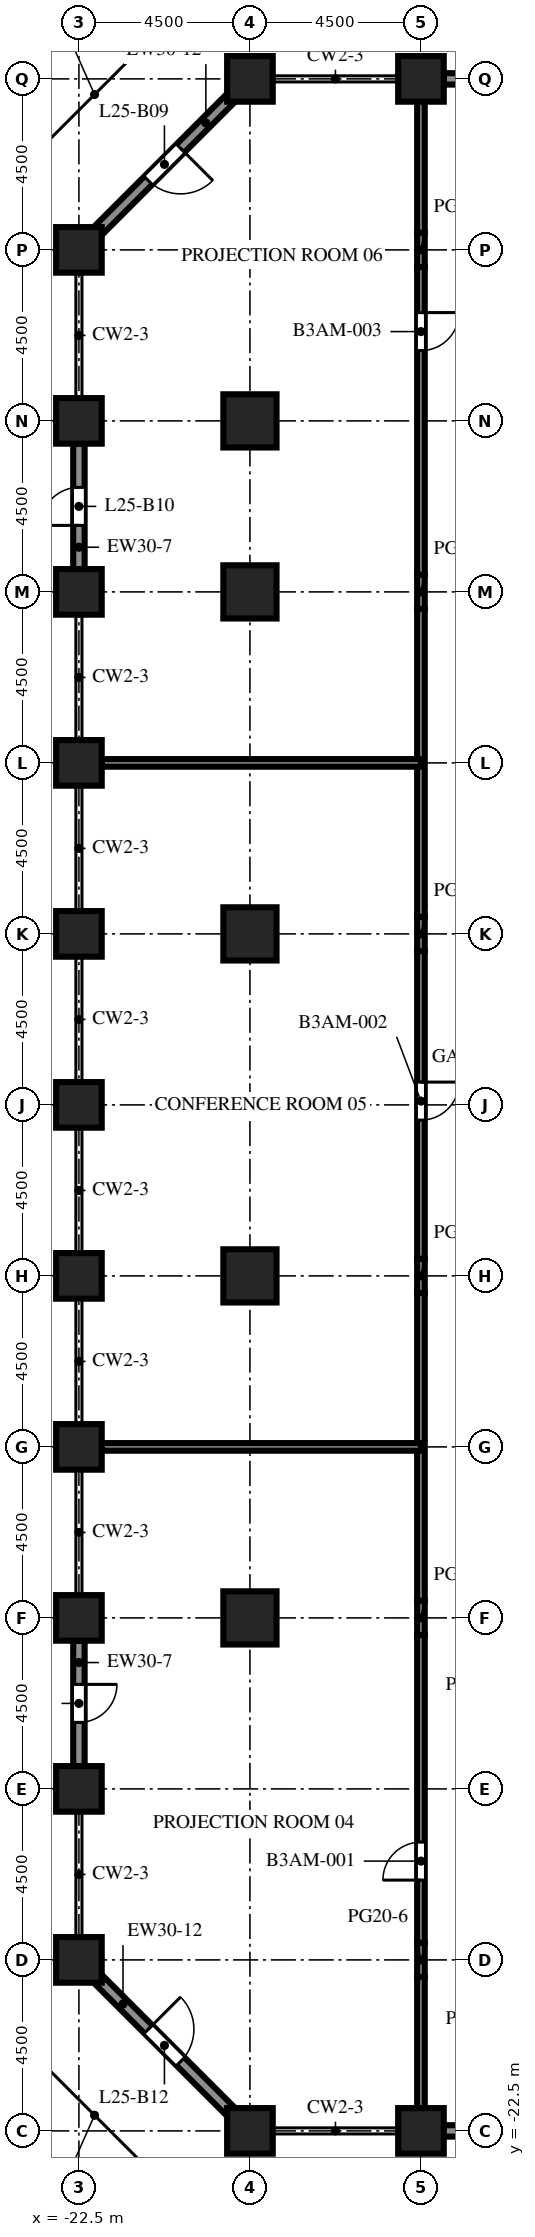
"""IFC4 building model, lengths in metres.
Left out: names, types, materials, properties, quantities, classifications, styles, units other than length and angle.
Written with IfcOpenShell. Run it as: python <this file> out.ifc"""

import sys

from ifc_helpers import new_model, si_unit, direction, frame, frame_2d, origin, origin_2d, place, context, subcontext, project, spatial, rectangle, extrude, element, fill, save


model = new_model("IFC4")
c1 = context("Model", 3, precision=1e-05, world=origin(), true_north=direction((0.0, 1.0)))
c2 = subcontext(c1, "Body", "Model", "MODEL_VIEW")
j1 = project(units=[si_unit("LENGTHUNIT", "METRE"), si_unit("PLANEANGLEUNIT", "RADIAN")], contexts=[c1])
p1 = place(None, origin())
s1 = spatial("IfcSite", under=j1, at=p1, CompositionType="ELEMENT")
p2 = place(p1, origin())
s2 = spatial("IfcBuilding", under=s1, at=p2, CompositionType="ELEMENT")
p3 = place(p2, frame((0.0, 0.0, 110.7)))
s3 = spatial("IfcBuildingStorey", under=s2, at=p3, CompositionType="ELEMENT", Elevation=110.7)
p4 = place(p3, frame((-22.5, -18.0, 0.0), z_axis=(0.0, 0.0, 1.0), x_axis=(1.0, 0.0, 0.0)))
e1 = element("IfcColumn", 1, at=p4, inside=s3, PredefinedType="COLUMN", context=c2, shape_type="SweptSolid", body=[
    extrude(rectangle(XDim=1.2, YDim=1.2, at=origin_2d()), origin(), (0.0, 0.0, 1.0), 3.75),
])
p5 = place(p3, frame((-22.5, -13.5, 0.0), z_axis=(0.0, 0.0, 1.0), x_axis=(1.0, 0.0, 0.0)))
e2 = element("IfcColumn", 2, at=p5, inside=s3, PredefinedType="COLUMN", context=c2, shape_type="SweptSolid", body=[
    extrude(rectangle(XDim=1.2, YDim=1.2, at=origin_2d()), origin(), (0.0, 0.0, 1.0), 6.0),
])
p6 = place(p3, frame((-22.5, -9.0, 0.0), z_axis=(0.0, 0.0, 1.0), x_axis=(1.0, 0.0, 0.0)))
e3 = element("IfcColumn", 3, at=p6, inside=s3, PredefinedType="COLUMN", context=c2, shape_type="SweptSolid", body=[
    extrude(rectangle(XDim=1.2, YDim=1.2, at=origin_2d()), origin(), (0.0, 0.0, 1.0), 3.75),
])
p7 = place(p3, frame((-22.5, -4.5, 0.0), z_axis=(0.0, 0.0, 1.0), x_axis=(1.0, 0.0, 0.0)))
e4 = element("IfcColumn", 4, at=p7, inside=s3, PredefinedType="COLUMN", context=c2, shape_type="SweptSolid", body=[
    extrude(rectangle(XDim=1.2, YDim=1.2, at=origin_2d()), origin(), (0.0, 0.0, 1.0), 6.0),
])
p8 = place(p3, frame((-22.5, 0.0, 0.0), z_axis=(0.0, 0.0, 1.0), x_axis=(1.0, 0.0, 0.0)))
e5 = element("IfcColumn", 5, at=p8, inside=s3, PredefinedType="COLUMN", context=c2, shape_type="SweptSolid", body=[
    extrude(rectangle(XDim=1.2, YDim=1.2, at=origin_2d()), origin(), (0.0, 0.0, 1.0), 3.75),
])
p9 = place(p3, frame((-22.5, 4.5, 0.0), z_axis=(0.0, 0.0, 1.0), x_axis=(1.0, 0.0, 0.0)))
e6 = element("IfcColumn", 6, at=p9, inside=s3, PredefinedType="COLUMN", context=c2, shape_type="SweptSolid", body=[
    extrude(rectangle(XDim=1.2, YDim=1.2, at=origin_2d()), origin(), (0.0, 0.0, 1.0), 6.0),
])
p10 = place(p3, frame((-22.5, 9.0, 0.0), z_axis=(0.0, 0.0, 1.0), x_axis=(1.0, 0.0, 0.0)))
e7 = element("IfcColumn", 7, at=p10, inside=s3, PredefinedType="COLUMN", context=c2, shape_type="SweptSolid", body=[
    extrude(rectangle(XDim=1.2, YDim=1.2, at=origin_2d()), origin(), (0.0, 0.0, 1.0), 3.75),
])
p11 = place(p3, frame((-22.5, 13.5, 0.0), z_axis=(0.0, 0.0, 1.0), x_axis=(1.0, 0.0, 0.0)))
e8 = element("IfcColumn", 8, at=p11, inside=s3, PredefinedType="COLUMN", context=c2, shape_type="SweptSolid", body=[
    extrude(rectangle(XDim=1.2, YDim=1.2, at=origin_2d()), origin(), (0.0, 0.0, 1.0), 6.0),
])
p12 = place(p3, frame((-22.5, 18.0, 0.0), z_axis=(0.0, 0.0, 1.0), x_axis=(1.0, 0.0, 0.0)))
e9 = element("IfcColumn", 9, at=p12, inside=s3, PredefinedType="COLUMN", context=c2, shape_type="SweptSolid", body=[
    extrude(rectangle(XDim=1.2, YDim=1.2, at=origin_2d()), origin(), (0.0, 0.0, 1.0), 3.75),
])
p13 = place(p3, frame((-22.5, 22.5, 0.0), z_axis=(0.0, 0.0, 1.0), x_axis=(1.0, 0.0, 0.0)))
e10 = element("IfcColumn", 10, at=p13, inside=s3, PredefinedType="COLUMN", context=c2, shape_type="SweptSolid", body=[
    extrude(rectangle(XDim=1.2, YDim=1.2, at=origin_2d()), origin(), (0.0, 0.0, 1.0), 6.0),
])
p14 = place(p3, frame((-22.5, 27.0, 0.0), z_axis=(0.0, 0.0, 1.0), x_axis=(1.0, 0.0, 0.0)))
e11 = element("IfcColumn", 11, at=p14, inside=s3, PredefinedType="COLUMN", context=c2, shape_type="SweptSolid", body=[
    extrude(rectangle(XDim=1.2, YDim=1.2, at=origin_2d()), origin(), (0.0, 0.0, 1.0), 3.75),
])
for number, where, z_axis, x_axis in (
    (12, (-18.0, -22.5, 0.0), (0.0, 0.0, 1.0), (1.0, 0.0, 0.0)),
    (13, (-18.0, 31.5, 0.0), (0.0, 0.0, 1.0), (1.0, 0.0, 0.0)),
    (14, (-13.5, -22.5, 0.0), (0.0, 0.0, 1.0), (1.0, 0.0, 0.0)),
    (15, (-13.5, 31.5, 0.0), (0.0, 0.0, 1.0), (1.0, 0.0, 0.0)),
):
    element("IfcColumn", number, at=place(p3, frame(where, z_axis=z_axis, x_axis=x_axis)), inside=s3, PredefinedType="COLUMN", context=c2, shape_type="SweptSolid", body=[
        extrude(rectangle(XDim=1.2, YDim=1.2, at=origin_2d()), origin(), (0.0, 0.0, 1.0), 6.0),
    ])
for number, where, z_axis, x_axis in (
    (16, (-18.0, -9.0, 0.0), (0.0, 0.0, 1.0), (1.0, 0.0, 0.0)),
    (17, (-18.0, 0.0, 0.0), (0.0, 0.0, 1.0), (1.0, 0.0, 0.0)),
    (18, (-18.0, 9.0, 0.0), (0.0, 0.0, 1.0), (1.0, 0.0, 0.0)),
    (19, (-18.0, 18.0, 0.0), (0.0, 0.0, 1.0), (1.0, 0.0, 0.0)),
):
    element("IfcColumn", number, at=place(p3, frame(where, z_axis=z_axis, x_axis=x_axis)), inside=s3, PredefinedType="COLUMN", context=c2, shape_type="SweptSolid", body=[
        extrude(rectangle(XDim=1.4, YDim=1.4, at=origin_2d()), origin(), (0.0, 0.0, 1.0), 5.55),
    ])
p15 = place(p3, frame((-18.0, 22.5, 0.0), z_axis=(0.0, 0.0, 1.0), x_axis=(1.0, 0.0, 0.0)))
e20 = element("IfcColumn", 20, at=p15, inside=s3, PredefinedType="COLUMN", context=c2, shape_type="SweptSolid", body=[
    extrude(rectangle(XDim=1.4, YDim=1.4, at=origin_2d()), origin(), (0.0, 0.0, 1.0), 6.0),
])
p16 = place(p3, frame((-9.6, -22.5, 0.0), z_axis=(0.0, 0.0, 1.0), x_axis=(-1.0, 0.0, 0.0)))
e21 = element("IfcWall", 21, at=p16, inside=s3, PredefinedType="SOLIDWALL", context=c2, shape_type="SweptSolid", body=[
    extrude(rectangle(XDim=3.3, YDim=0.3, at=frame_2d((1.65, 0.0))), origin(), (0.0, 0.0, 1.0), 4.65),
])
p17 = place(p16, frame((1.15, 0.0, 0.0)))
e22 = element("IfcOpeningElement", 22, at=p17, cuts=e21, PredefinedType="OPENING", context=c2, shape_type="SweptSolid", body=[
    extrude(rectangle(XDim=1.0, YDim=2.2, at=frame_2d((0.5, 1.1))), frame((0.0, 0.16, 0.0), z_axis=(0.0, -1.0, 0.0), x_axis=(1.0, 0.0, 0.0)), (0.0, 0.0, 1.0), 0.32),
])
p18 = place(p3, frame((-12.9, 31.5, 0.0), z_axis=(0.0, 0.0, 1.0), x_axis=(1.0, 0.0, 0.0)))
e23 = element("IfcWall", 23, at=p18, inside=s3, PredefinedType="SOLIDWALL", context=c2, shape_type="SweptSolid", body=[
    extrude(rectangle(XDim=3.3, YDim=0.3, at=frame_2d((1.65, 0.0))), origin(), (0.0, 0.0, 1.0), 4.65),
])
p19 = place(p18, frame((1.15, 0.0, 0.0)))
e24 = element("IfcOpeningElement", 24, at=p19, cuts=e23, PredefinedType="OPENING", context=c2, shape_type="SweptSolid", body=[
    extrude(rectangle(XDim=1.0, YDim=2.2, at=frame_2d((0.5, 1.1))), frame((0.0, 0.16, 0.0), z_axis=(0.0, -1.0, 0.0), x_axis=(1.0, 0.0, 0.0)), (0.0, 0.0, 1.0), 0.32),
])
p20 = place(p3, frame((-22.006, 27.494, 0.0), z_axis=(0.0, 0.0, 1.0), x_axis=(0.707106781187, 0.707106781187, 0.0)))
e25 = element("IfcWall", 25, at=p20, inside=s3, PredefinedType="SOLIDWALL", context=c2, shape_type="SweptSolid", body=[
    extrude(rectangle(XDim=4.967, YDim=0.3, at=frame_2d((2.483, 0.0))), origin(), (0.0, 0.0, 1.0), 3.75),
])
p21 = place(p20, frame((1.884, 0.0, 0.0)))
e26 = element("IfcOpeningElement", 26, at=p21, cuts=e25, PredefinedType="OPENING", context=c2, shape_type="SweptSolid", body=[
    extrude(rectangle(XDim=1.2, YDim=2.2, at=frame_2d((0.6, 1.1))), frame((0.0, 0.16, 0.0), z_axis=(0.0, -1.0, 0.0), x_axis=(1.0, 0.0, 0.0)), (0.0, 0.0, 1.0), 0.32),
])
p22 = place(p3, frame((-22.5, 18.6, 0.0), z_axis=(0.0, 0.0, 1.0), x_axis=(0.0, 1.0, 0.0)))
e27 = element("IfcWall", 27, at=p22, inside=s3, PredefinedType="SOLIDWALL", context=c2, shape_type="SweptSolid", body=[
    extrude(rectangle(XDim=3.3, YDim=0.3, at=frame_2d((1.65, 0.0))), origin(), (0.0, 0.0, 1.0), 4.65),
])
p23 = place(p22, frame((1.15, 0.0, 0.0)))
e28 = element("IfcOpeningElement", 28, at=p23, cuts=e27, PredefinedType="OPENING", context=c2, shape_type="SweptSolid", body=[
    extrude(rectangle(XDim=1.0, YDim=2.2, at=frame_2d((0.5, 1.1))), frame((0.0, 0.16, 0.0), z_axis=(0.0, -1.0, 0.0), x_axis=(1.0, 0.0, 0.0)), (0.0, 0.0, 1.0), 0.32),
])
p24 = place(p3, frame((-22.5, -12.9, 0.0), z_axis=(0.0, 0.0, 1.0), x_axis=(0.0, 1.0, 0.0)))
e29 = element("IfcWall", 29, at=p24, inside=s3, PredefinedType="SOLIDWALL", context=c2, shape_type="SweptSolid", body=[
    extrude(rectangle(XDim=3.3, YDim=0.3, at=frame_2d((1.65, 0.0))), origin(), (0.0, 0.0, 1.0), 4.65),
])
p25 = place(p24, frame((1.15, 0.0, 0.0)))
e30 = element("IfcOpeningElement", 30, at=p25, cuts=e29, PredefinedType="OPENING", context=c2, shape_type="SweptSolid", body=[
    extrude(rectangle(XDim=1.0, YDim=2.2, at=frame_2d((0.5, 1.1))), frame((0.0, 0.16, 0.0), z_axis=(0.0, -1.0, 0.0), x_axis=(1.0, 0.0, 0.0)), (0.0, 0.0, 1.0), 0.32),
])
p26 = place(p3, frame((-18.494, -22.006, 0.0), z_axis=(0.0, 0.0, 1.0), x_axis=(-0.707106781187, 0.707106781187, 0.0)))
e31 = element("IfcWall", 31, at=p26, inside=s3, PredefinedType="SOLIDWALL", context=c2, shape_type="SweptSolid", body=[
    extrude(rectangle(XDim=4.967, YDim=0.3, at=frame_2d((2.483, 0.0))), origin(), (0.0, 0.0, 1.0), 3.75),
])
p27 = place(p26, frame((1.884, 0.0, 0.0)))
e32 = element("IfcOpeningElement", 32, at=p27, cuts=e31, PredefinedType="OPENING", context=c2, shape_type="SweptSolid", body=[
    extrude(rectangle(XDim=1.2, YDim=2.2, at=frame_2d((0.6, 1.1))), frame((0.0, 0.16, 0.0), z_axis=(0.0, -1.0, 0.0), x_axis=(1.0, 0.0, 0.0)), (0.0, 0.0, 1.0), 0.32),
])
p28 = place(p3, frame((-13.5, -21.9, 0.0), z_axis=(0.0, 0.0, 1.0), x_axis=(0.0, 1.0, 0.0)))
e33 = element("IfcWall", 33, at=p28, inside=s3, PredefinedType="PARTITIONING", context=c2, shape_type="SweptSolid", body=[
    extrude(rectangle(XDim=3.45, YDim=0.2, at=frame_2d((1.725, 0.0))), origin(), (0.0, 0.0, 1.0), 5.55),
])
p29 = place(p3, frame((-13.5, -18.45, 0.0), z_axis=(0.0, 0.0, 1.0), x_axis=(0.0, 1.0, 0.0)))
e34 = element("IfcWall", 34, at=p29, inside=s3, PredefinedType="PARTITIONING", context=c2, shape_type="SweptSolid", body=[
    extrude(rectangle(XDim=0.9, YDim=0.2, at=frame_2d((0.45, 0.0))), origin(), (0.0, 0.0, 1.0), 3.72),
])
p30 = place(p3, frame((-13.5, -17.55, 0.0), z_axis=(0.0, 0.0, 1.0), x_axis=(0.0, 1.0, 0.0)))
e35 = element("IfcWall", 35, at=p30, inside=s3, PredefinedType="PARTITIONING", context=c2, shape_type="SweptSolid", body=[
    extrude(rectangle(XDim=8.1, YDim=0.2, at=frame_2d((4.05, 0.0))), origin(), (0.0, 0.0, 1.0), 5.55),
])
p31 = place(p30, frame((1.65, 0.0, 0.0)))
e36 = element("IfcOpeningElement", 36, at=p31, cuts=e35, PredefinedType="OPENING", context=c2, shape_type="SweptSolid", body=[
    extrude(rectangle(XDim=1.0, YDim=2.1, at=frame_2d((0.5, 1.05))), frame((0.0, 0.11, 0.0), z_axis=(0.0, -1.0, 0.0), x_axis=(1.0, 0.0, 0.0)), (0.0, 0.0, 1.0), 0.22),
])
p32 = place(p3, frame((-13.5, -9.45, 0.0), z_axis=(0.0, 0.0, 1.0), x_axis=(0.0, 1.0, 0.0)))
e37 = element("IfcWall", 37, at=p32, inside=s3, PredefinedType="PARTITIONING", context=c2, shape_type="SweptSolid", body=[
    extrude(rectangle(XDim=0.9, YDim=0.2, at=frame_2d((0.45, 0.0))), origin(), (0.0, 0.0, 1.0), 3.72),
])
p33 = place(p3, frame((-13.5, -8.55, 0.0), z_axis=(0.0, 0.0, 1.0), x_axis=(0.0, 1.0, 0.0)))
e38 = element("IfcWall", 38, at=p33, inside=s3, PredefinedType="PARTITIONING", context=c2, shape_type="SweptSolid", body=[
    extrude(rectangle(XDim=8.1, YDim=0.2, at=frame_2d((4.05, 0.0))), origin(), (0.0, 0.0, 1.0), 5.55),
])
p34 = place(p3, frame((-13.5, -0.45, 0.0), z_axis=(0.0, 0.0, 1.0), x_axis=(0.0, 1.0, 0.0)))
e39 = element("IfcWall", 39, at=p34, inside=s3, PredefinedType="PARTITIONING", context=c2, shape_type="SweptSolid", body=[
    extrude(rectangle(XDim=0.9, YDim=0.2, at=frame_2d((0.45, 0.0))), origin(), (0.0, 0.0, 1.0), 3.72),
])
p35 = place(p3, frame((-13.5, 0.45, 0.0), z_axis=(0.0, 0.0, 1.0), x_axis=(0.0, 1.0, 0.0)))
e40 = element("IfcWall", 40, at=p35, inside=s3, PredefinedType="PARTITIONING", context=c2, shape_type="SweptSolid", body=[
    extrude(rectangle(XDim=8.1, YDim=0.2, at=frame_2d((4.05, 0.0))), origin(), (0.0, 0.0, 1.0), 5.55),
])
p36 = place(p35, frame((3.65, 0.0, 0.0)))
e41 = element("IfcOpeningElement", 41, at=p36, cuts=e40, PredefinedType="OPENING", context=c2, shape_type="SweptSolid", body=[
    extrude(rectangle(XDim=1.0, YDim=2.1, at=frame_2d((0.5, 1.05))), frame((0.0, 0.11, 0.0), z_axis=(0.0, -1.0, 0.0), x_axis=(1.0, 0.0, 0.0)), (0.0, 0.0, 1.0), 0.22),
])
p37 = place(p3, frame((-13.5, 8.55, 0.0), z_axis=(0.0, 0.0, 1.0), x_axis=(0.0, 1.0, 0.0)))
e42 = element("IfcWall", 42, at=p37, inside=s3, PredefinedType="PARTITIONING", context=c2, shape_type="SweptSolid", body=[
    extrude(rectangle(XDim=0.9, YDim=0.2, at=frame_2d((0.45, 0.0))), origin(), (0.0, 0.0, 1.0), 3.72),
])
p38 = place(p3, frame((-13.5, 9.45, 0.0), z_axis=(0.0, 0.0, 1.0), x_axis=(0.0, 1.0, 0.0)))
e43 = element("IfcWall", 43, at=p38, inside=s3, PredefinedType="PARTITIONING", context=c2, shape_type="SweptSolid", body=[
    extrude(rectangle(XDim=8.1, YDim=0.2, at=frame_2d((4.05, 0.0))), origin(), (0.0, 0.0, 1.0), 5.55),
])
p39 = place(p3, frame((-13.5, 17.55, 0.0), z_axis=(0.0, 0.0, 1.0), x_axis=(0.0, 1.0, 0.0)))
e44 = element("IfcWall", 44, at=p39, inside=s3, PredefinedType="PARTITIONING", context=c2, shape_type="SweptSolid", body=[
    extrude(rectangle(XDim=0.9, YDim=0.2, at=frame_2d((0.45, 0.0))), origin(), (0.0, 0.0, 1.0), 3.72),
])
p40 = place(p3, frame((-13.5, 18.45, 0.0), z_axis=(0.0, 0.0, 1.0), x_axis=(0.0, 1.0, 0.0)))
e45 = element("IfcWall", 45, at=p40, inside=s3, PredefinedType="PARTITIONING", context=c2, shape_type="SweptSolid", body=[
    extrude(rectangle(XDim=8.1, YDim=0.2, at=frame_2d((4.05, 0.0))), origin(), (0.0, 0.0, 1.0), 5.55),
])
p41 = place(p40, frame((5.9, 0.0, 0.0)))
e46 = element("IfcOpeningElement", 46, at=p41, cuts=e45, PredefinedType="OPENING", context=c2, shape_type="SweptSolid", body=[
    extrude(rectangle(XDim=1.0, YDim=2.1, at=frame_2d((0.5, 1.05))), frame((0.0, 0.11, 0.0), z_axis=(0.0, -1.0, 0.0), x_axis=(1.0, 0.0, 0.0)), (0.0, 0.0, 1.0), 0.22),
])
p42 = place(p3, frame((-13.5, 26.55, 0.0), z_axis=(0.0, 0.0, 1.0), x_axis=(0.0, 1.0, 0.0)))
e47 = element("IfcWall", 47, at=p42, inside=s3, PredefinedType="PARTITIONING", context=c2, shape_type="SweptSolid", body=[
    extrude(rectangle(XDim=0.9, YDim=0.2, at=frame_2d((0.45, 0.0))), origin(), (0.0, 0.0, 1.0), 3.72),
])
p43 = place(p3, frame((-13.5, 27.45, 0.0), z_axis=(0.0, 0.0, 1.0), x_axis=(0.0, 1.0, 0.0)))
e48 = element("IfcWall", 48, at=p43, inside=s3, PredefinedType="PARTITIONING", context=c2, shape_type="SweptSolid", body=[
    extrude(rectangle(XDim=3.45, YDim=0.2, at=frame_2d((1.725, 0.0))), origin(), (0.0, 0.0, 1.0), 5.55),
])
for number, where, z_axis, x_axis in (
    (49, (-21.9, -4.5, 0.0), (0.0, 0.0, 1.0), (1.0, 0.0, 0.0)),
    (50, (-21.9, 13.5, 0.0), (0.0, 0.0, 1.0), (1.0, 0.0, 0.0)),
):
    element("IfcWall", number, at=place(p3, frame(where, z_axis=z_axis, x_axis=x_axis)), inside=s3, PredefinedType="PARTITIONING", context=c2, shape_type="SweptSolid", body=[
        extrude(rectangle(XDim=8.4, YDim=0.2, at=frame_2d((4.2, 0.0))), origin(), (0.0, 0.0, 1.0), 5.55),
    ])
p44 = place(p21, origin())
e51 = element("IfcDoor", 51, at=p44, inside=s3, OperationType="SINGLE_SWING_RIGHT", PredefinedType="DOOR", context=c2, shape_type="SweptSolid", body=[
    extrude(rectangle(XDim=1.2, YDim=2.2, at=frame_2d((0.6, 1.1))), frame((0.0, 0.025, 0.0), z_axis=(0.0, -1.0, 0.0), x_axis=(1.0, 0.0, 0.0)), (0.0, 0.0, 1.0), 0.05),
])
fill(e26, e51)
p45 = place(p23, origin())
e52 = element("IfcDoor", 52, at=p45, inside=s3, OperationType="SINGLE_SWING_LEFT", PredefinedType="DOOR", context=c2, shape_type="SweptSolid", body=[
    extrude(rectangle(XDim=1.0, YDim=2.2, at=frame_2d((0.5, 1.1))), frame((0.0, 0.025, 0.0), z_axis=(0.0, -1.0, 0.0), x_axis=(1.0, 0.0, 0.0)), (0.0, 0.0, 1.0), 0.05),
])
fill(e28, e52)
p46 = place(p25, origin())
e53 = element("IfcDoor", 53, at=p46, inside=s3, OperationType="SINGLE_SWING_RIGHT", PredefinedType="DOOR", context=c2, shape_type="SweptSolid", body=[
    extrude(rectangle(XDim=1.0, YDim=2.2, at=frame_2d((0.5, 1.1))), frame((0.0, 0.025, 0.0), z_axis=(0.0, -1.0, 0.0), x_axis=(1.0, 0.0, 0.0)), (0.0, 0.0, 1.0), 0.05),
])
fill(e30, e53)
p47 = place(p27, origin())
e54 = element("IfcDoor", 54, at=p47, inside=s3, OperationType="SINGLE_SWING_RIGHT", PredefinedType="DOOR", context=c2, shape_type="SweptSolid", body=[
    extrude(rectangle(XDim=1.2, YDim=2.2, at=frame_2d((0.6, 1.1))), frame((0.0, 0.025, 0.0), z_axis=(0.0, -1.0, 0.0), x_axis=(1.0, 0.0, 0.0)), (0.0, 0.0, 1.0), 0.05),
])
fill(e32, e54)
p48 = place(p31, origin())
e55 = element("IfcDoor", 55, at=p48, inside=s3, OperationType="SINGLE_SWING_LEFT", PredefinedType="DOOR", context=c2, shape_type="SweptSolid", body=[
    extrude(rectangle(XDim=1.0, YDim=2.1, at=frame_2d((0.5, 1.05))), frame((0.0, 0.025, 0.0), z_axis=(0.0, -1.0, 0.0), x_axis=(1.0, 0.0, 0.0)), (0.0, 0.0, 1.0), 0.05),
])
fill(e36, e55)
p49 = place(p36, origin())
e56 = element("IfcDoor", 56, at=p49, inside=s3, OperationType="SINGLE_SWING_RIGHT", PredefinedType="DOOR", context=c2, shape_type="SweptSolid", body=[
    extrude(rectangle(XDim=1.0, YDim=2.1, at=frame_2d((0.5, 1.05))), frame((0.0, 0.025, 0.0), z_axis=(0.0, -1.0, 0.0), x_axis=(1.0, 0.0, 0.0)), (0.0, 0.0, 1.0), 0.05),
])
fill(e41, e56)
p50 = place(p41, origin())
e57 = element("IfcDoor", 57, at=p50, inside=s3, OperationType="SINGLE_SWING_RIGHT", PredefinedType="DOOR", context=c2, shape_type="SweptSolid", body=[
    extrude(rectangle(XDim=1.0, YDim=2.1, at=frame_2d((0.5, 1.05))), frame((0.0, 0.025, 0.0), z_axis=(0.0, -1.0, 0.0), x_axis=(1.0, 0.0, 0.0)), (0.0, 0.0, 1.0), 0.05),
])
fill(e46, e57)
save(model, sys.argv[1])
